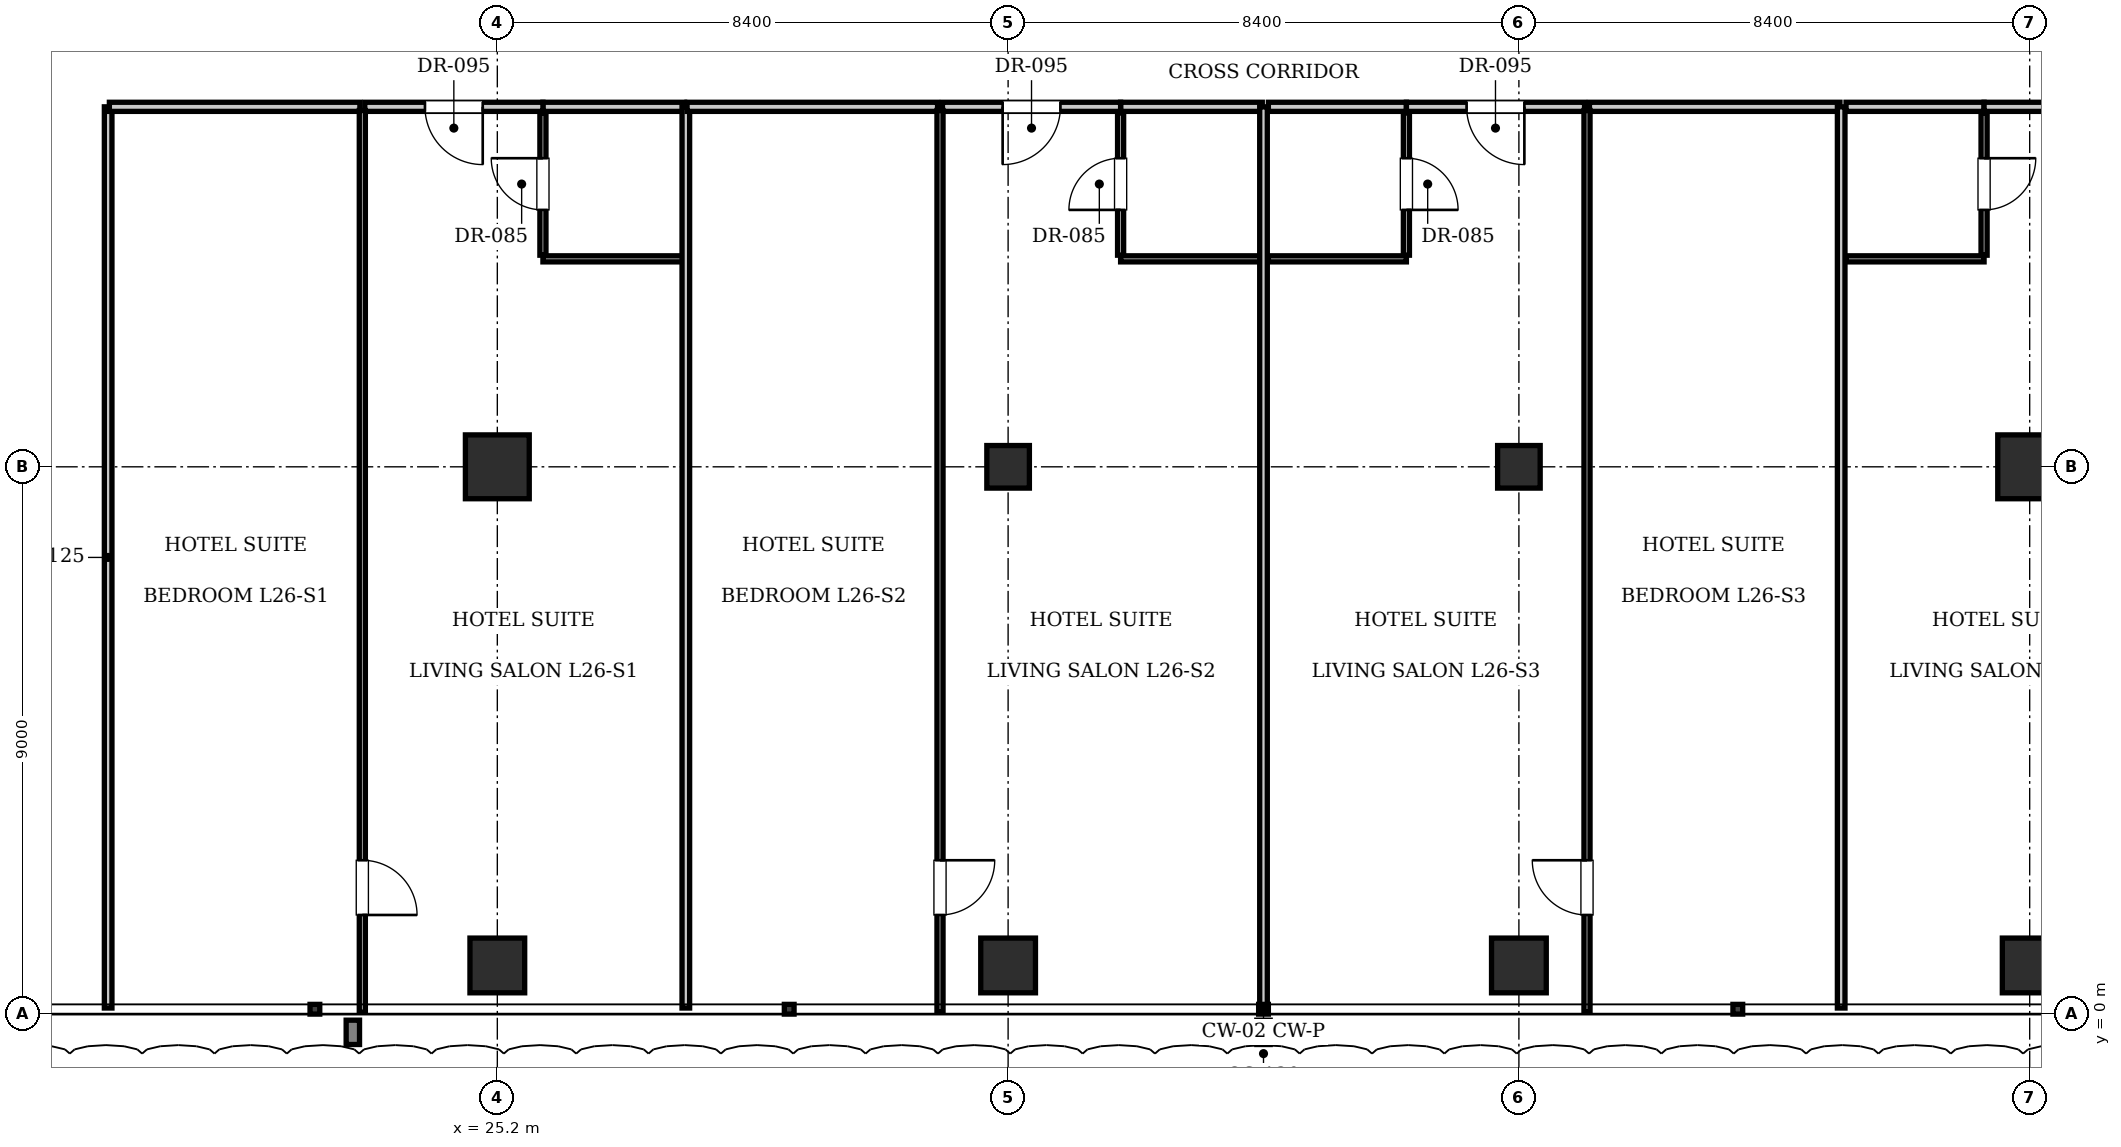
"""IFC4 building model, lengths in metres.
Left out: names, types, materials, properties, quantities, classifications, styles, units other than length and angle.
Written with IfcOpenShell. Run it as: python <this file> out.ifc"""

import sys

from ifc_helpers import new_model, si_unit, direction, frame, frame_2d, origin, origin_2d, place, context, subcontext, project, spatial, rectangle, i_section, extrude, element, fill, save


model = new_model("IFC4")
c1 = context("Model", 3, precision=1e-05, world=origin(), true_north=direction((0.0, 1.0)))
c2 = subcontext(c1, "Body", "Model", "MODEL_VIEW")
j1 = project(units=[si_unit("LENGTHUNIT", "METRE"), si_unit("PLANEANGLEUNIT", "RADIAN")], contexts=[c1])
p1 = place(None, origin())
s1 = spatial("IfcSite", under=j1, at=p1, CompositionType="ELEMENT")
p2 = place(p1, origin())
s2 = spatial("IfcBuilding", under=s1, at=p2, CompositionType="ELEMENT")
p3 = place(p2, frame((0.0, 0.0, 107.8)))
s3 = spatial("IfcBuildingStorey", under=s2, at=p3, CompositionType="ELEMENT", Elevation=107.8)
for number, where, z_axis, x_axis in (
    (1, (25.2, 9.0, 0.0), (0.0, 0.0, 1.0), (1.0, 0.0, 0.0)),
    (2, (50.4, 9.0, 0.0), (0.0, 0.0, 1.0), (1.0, 0.0, 0.0)),
):
    element("IfcColumn", number, at=place(p3, frame(where, z_axis=z_axis, x_axis=x_axis)), inside=s3, PredefinedType="COLUMN", context=c2, shape_type="SweptSolid", body=[
        extrude(rectangle(XDim=1.05, YDim=1.05, at=origin_2d()), origin(), (0.0, 0.0, 1.0), 3.85),
    ])
for number, where, z_axis, x_axis in (
    (3, (33.6, 9.0, 0.0), (0.0, 0.0, 1.0), (1.0, 0.0, 0.0)),
    (4, (42.0, 9.0, 0.0), (0.0, 0.0, 1.0), (1.0, 0.0, 0.0)),
):
    element("IfcColumn", number, at=place(p3, frame(where, z_axis=z_axis, x_axis=x_axis)), inside=s3, PredefinedType="COLUMN", context=c2, shape_type="SweptSolid", body=[
        extrude(i_section(OverallWidth=0.7, OverallDepth=0.7, WebThickness=0.028, FlangeThickness=0.044, at=origin_2d()), origin(), (0.0, 0.0, 1.0), 3.85),
    ])
for number, where, z_axis, x_axis in (
    (5, (25.2, 0.8, 0.0), (0.0, 0.0, 1.0), (1.0, 0.0, 0.0)),
    (6, (33.6, 0.8, 0.0), (0.0, 0.0, 1.0), (1.0, 0.0, 0.0)),
    (7, (42.0, 0.8, 0.0), (0.0, 0.0, 1.0), (1.0, 0.0, 0.0)),
    (8, (50.4, 0.8, 0.0), (0.0, 0.0, 1.0), (1.0, 0.0, 0.0)),
):
    element("IfcColumn", number, at=place(p3, frame(where, z_axis=z_axis, x_axis=x_axis)), inside=s3, PredefinedType="COLUMN", context=c2, shape_type="SweptSolid", body=[
        extrude(rectangle(XDim=0.9, YDim=0.9, at=origin_2d()), origin(), (0.0, 0.0, 1.0), 3.85),
    ])
p4 = place(p3, frame((18.8, 0.1, 0.0), z_axis=(0.0, 0.0, 1.0), x_axis=(0.0, 1.0, 0.0)))
e9 = element("IfcWall", 9, at=p4, inside=s3, PredefinedType="PARTITIONING", context=c2, shape_type="SweptSolid", body=[
    extrude(rectangle(XDim=14.82, YDim=0.125, at=frame_2d((7.41, 0.0))), origin(), (0.0, 0.0, 1.0), 3.61),
])
p5 = place(p3, frame((25.95, 14.92, 0.0), z_axis=(0.0, 0.0, 1.0), x_axis=(1.0, 0.0, 0.0)))
e10 = element("IfcWall", 10, at=p5, inside=s3, PredefinedType="PARTITIONING", context=c2, shape_type="SweptSolid", body=[
    extrude(rectangle(XDim=2.33, YDim=0.15, at=frame_2d((1.165, 0.0))), origin(), (0.0, 0.0, 1.0), 3.61),
])
p6 = place(p3, frame((25.95, 12.42, 0.0), z_axis=(0.0, 0.0, 1.0), x_axis=(1.0, 0.0, 0.0)))
e11 = element("IfcWall", 11, at=p6, inside=s3, PredefinedType="PARTITIONING", context=c2, shape_type="SweptSolid", body=[
    extrude(rectangle(XDim=2.31, YDim=0.1, at=frame_2d((1.155, 0.0))), origin(), (0.0, 0.0, 1.0), 3.61),
])
p7 = place(p3, frame((25.95, 12.48, 0.0), z_axis=(0.0, 0.0, 1.0), x_axis=(0.0, 1.0, 0.0)))
e12 = element("IfcWall", 12, at=p7, inside=s3, PredefinedType="PARTITIONING", context=c2, shape_type="SweptSolid", body=[
    extrude(rectangle(XDim=2.34, YDim=0.1, at=frame_2d((1.17, 0.0))), origin(), (0.0, 0.0, 1.0), 3.61),
])
p8 = place(p7, frame((0.745, 0.0, 0.0)))
e13 = element("IfcOpeningElement", 13, at=p8, cuts=e12, PredefinedType="OPENING", context=c2, shape_type="SweptSolid", body=[
    extrude(rectangle(XDim=0.85, YDim=2.1, at=frame_2d((0.425, 1.05))), frame((0.0, 0.06, 0.0), z_axis=(0.0, -1.0, 0.0), x_axis=(1.0, 0.0, 0.0)), (0.0, 0.0, 1.0), 0.12),
])
p9 = place(p3, frame((18.82, 14.92, 0.0), z_axis=(0.0, 0.0, 1.0), x_axis=(1.0, 0.0, 0.0)))
e14 = element("IfcWall", 14, at=p9, inside=s3, PredefinedType="PARTITIONING", context=c2, shape_type="SweptSolid", body=[
    extrude(rectangle(XDim=4.12, YDim=0.15, at=frame_2d((2.06, 0.0))), origin(), (0.0, 0.0, 1.0), 3.61),
])
p10 = place(p3, frame((23.02, 14.92, 0.0), z_axis=(0.0, 0.0, 1.0), x_axis=(1.0, 0.0, 0.0)))
e15 = element("IfcWall", 15, at=p10, inside=s3, PredefinedType="PARTITIONING", context=c2, shape_type="SweptSolid", body=[
    extrude(rectangle(XDim=2.93, YDim=0.15, at=frame_2d((1.465, 0.0))), origin(), (0.0, 0.0, 1.0), 3.61),
])
p11 = place(p10, frame((0.99, 0.0, 0.0)))
e16 = element("IfcOpeningElement", 16, at=p11, cuts=e15, PredefinedType="OPENING", context=c2, shape_type="SweptSolid", body=[
    extrude(rectangle(XDim=0.95, YDim=2.15, at=frame_2d((0.475, 1.075))), frame((0.0, 0.085, 0.0), z_axis=(0.0, -1.0, 0.0), x_axis=(1.0, 0.0, 0.0)), (0.0, 0.0, 1.0), 0.17),
])
p12 = place(p3, frame((22.98, 0.03, 0.0), z_axis=(0.0, 0.0, 1.0), x_axis=(0.0, 1.0, 0.0)))
e17 = element("IfcWall", 17, at=p12, inside=s3, PredefinedType="PARTITIONING", context=c2, shape_type="SweptSolid", body=[
    extrude(rectangle(XDim=14.83, YDim=0.1, at=frame_2d((7.415, 0.0))), origin(), (0.0, 0.0, 1.0), 3.61),
])
p13 = place(p12, frame((1.6, 0.0, 0.0)))
e18 = element("IfcOpeningElement", 18, at=p13, cuts=e17, PredefinedType="OPENING", context=c2, shape_type="SweptSolid", body=[
    extrude(rectangle(XDim=0.9, YDim=2.1, at=frame_2d((0.45, 1.05))), frame((0.0, 0.06, 0.0), z_axis=(0.0, -1.0, 0.0), x_axis=(1.0, 0.0, 0.0)), (0.0, 0.0, 1.0), 0.12),
])
p14 = place(p3, frame((28.3, 0.1, 0.0), z_axis=(0.0, 0.0, 1.0), x_axis=(0.0, 1.0, 0.0)))
e19 = element("IfcWall", 19, at=p14, inside=s3, PredefinedType="PARTITIONING", context=c2, shape_type="SweptSolid", body=[
    extrude(rectangle(XDim=14.82, YDim=0.125, at=frame_2d((7.41, 0.0))), origin(), (0.0, 0.0, 1.0), 3.61),
])
p15 = place(p3, frame((35.45, 14.92, 0.0), z_axis=(0.0, 0.0, 1.0), x_axis=(1.0, 0.0, 0.0)))
e20 = element("IfcWall", 20, at=p15, inside=s3, PredefinedType="PARTITIONING", context=c2, shape_type="SweptSolid", body=[
    extrude(rectangle(XDim=2.33, YDim=0.15, at=frame_2d((1.165, 0.0))), origin(), (0.0, 0.0, 1.0), 3.61),
])
p16 = place(p3, frame((35.45, 12.42, 0.0), z_axis=(0.0, 0.0, 1.0), x_axis=(1.0, 0.0, 0.0)))
e21 = element("IfcWall", 21, at=p16, inside=s3, PredefinedType="PARTITIONING", context=c2, shape_type="SweptSolid", body=[
    extrude(rectangle(XDim=2.31, YDim=0.1, at=frame_2d((1.155, 0.0))), origin(), (0.0, 0.0, 1.0), 3.61),
])
p17 = place(p3, frame((35.45, 12.48, 0.0), z_axis=(0.0, 0.0, 1.0), x_axis=(0.0, 1.0, 0.0)))
e22 = element("IfcWall", 22, at=p17, inside=s3, PredefinedType="PARTITIONING", context=c2, shape_type="SweptSolid", body=[
    extrude(rectangle(XDim=2.34, YDim=0.1, at=frame_2d((1.17, 0.0))), origin(), (0.0, 0.0, 1.0), 3.61),
])
p18 = place(p17, frame((0.745, 0.0, 0.0)))
e23 = element("IfcOpeningElement", 23, at=p18, cuts=e22, PredefinedType="OPENING", context=c2, shape_type="SweptSolid", body=[
    extrude(rectangle(XDim=0.85, YDim=2.1, at=frame_2d((0.425, 1.05))), frame((0.0, 0.06, 0.0), z_axis=(0.0, -1.0, 0.0), x_axis=(1.0, 0.0, 0.0)), (0.0, 0.0, 1.0), 0.12),
])
p19 = place(p3, frame((28.32, 14.92, 0.0), z_axis=(0.0, 0.0, 1.0), x_axis=(1.0, 0.0, 0.0)))
e24 = element("IfcWall", 24, at=p19, inside=s3, PredefinedType="PARTITIONING", context=c2, shape_type="SweptSolid", body=[
    extrude(rectangle(XDim=4.12, YDim=0.15, at=frame_2d((2.06, 0.0))), origin(), (0.0, 0.0, 1.0), 3.61),
])
p20 = place(p3, frame((32.52, 14.92, 0.0), z_axis=(0.0, 0.0, 1.0), x_axis=(1.0, 0.0, 0.0)))
e25 = element("IfcWall", 25, at=p20, inside=s3, PredefinedType="PARTITIONING", context=c2, shape_type="SweptSolid", body=[
    extrude(rectangle(XDim=2.93, YDim=0.15, at=frame_2d((1.465, 0.0))), origin(), (0.0, 0.0, 1.0), 3.61),
])
p21 = place(p20, frame((0.99, 0.0, 0.0)))
e26 = element("IfcOpeningElement", 26, at=p21, cuts=e25, PredefinedType="OPENING", context=c2, shape_type="SweptSolid", body=[
    extrude(rectangle(XDim=0.95, YDim=2.15, at=frame_2d((0.475, 1.075))), frame((0.0, 0.085, 0.0), z_axis=(0.0, -1.0, 0.0), x_axis=(1.0, 0.0, 0.0)), (0.0, 0.0, 1.0), 0.17),
])
p22 = place(p3, frame((32.48, 0.03, 0.0), z_axis=(0.0, 0.0, 1.0), x_axis=(0.0, 1.0, 0.0)))
e27 = element("IfcWall", 27, at=p22, inside=s3, PredefinedType="PARTITIONING", context=c2, shape_type="SweptSolid", body=[
    extrude(rectangle(XDim=14.83, YDim=0.1, at=frame_2d((7.415, 0.0))), origin(), (0.0, 0.0, 1.0), 3.61),
])
p23 = place(p22, frame((1.6, 0.0, 0.0)))
e28 = element("IfcOpeningElement", 28, at=p23, cuts=e27, PredefinedType="OPENING", context=c2, shape_type="SweptSolid", body=[
    extrude(rectangle(XDim=0.9, YDim=2.1, at=frame_2d((0.45, 1.05))), frame((0.0, 0.06, 0.0), z_axis=(0.0, -1.0, 0.0), x_axis=(1.0, 0.0, 0.0)), (0.0, 0.0, 1.0), 0.12),
])
p24 = place(p3, frame((37.8, 0.1, 0.0), z_axis=(0.0, 0.0, 1.0), x_axis=(0.0, 1.0, 0.0)))
e29 = element("IfcWall", 29, at=p24, inside=s3, PredefinedType="PARTITIONING", context=c2, shape_type="SweptSolid", body=[
    extrude(rectangle(XDim=14.82, YDim=0.125, at=frame_2d((7.41, 0.0))), origin(), (0.0, 0.0, 1.0), 3.207),
])
p25 = place(p3, frame((37.88, 14.92, 0.0), z_axis=(0.0, 0.0, 1.0), x_axis=(1.0, 0.0, 0.0)))
e30 = element("IfcWall", 30, at=p25, inside=s3, PredefinedType="PARTITIONING", context=c2, shape_type="SweptSolid", body=[
    extrude(rectangle(XDim=2.27, YDim=0.15, at=frame_2d((1.135, 0.0))), origin(), (0.0, 0.0, 1.0), 3.61),
])
p26 = place(p3, frame((37.88, 12.42, 0.0), z_axis=(0.0, 0.0, 1.0), x_axis=(1.0, 0.0, 0.0)))
e31 = element("IfcWall", 31, at=p26, inside=s3, PredefinedType="PARTITIONING", context=c2, shape_type="SweptSolid", body=[
    extrude(rectangle(XDim=2.27, YDim=0.1, at=frame_2d((1.135, 0.0))), origin(), (0.0, 0.0, 1.0), 3.61),
])
p27 = place(p3, frame((40.15, 12.48, 0.0), z_axis=(0.0, 0.0, 1.0), x_axis=(0.0, 1.0, 0.0)))
e32 = element("IfcWall", 32, at=p27, inside=s3, PredefinedType="PARTITIONING", context=c2, shape_type="SweptSolid", body=[
    extrude(rectangle(XDim=2.34, YDim=0.1, at=frame_2d((1.17, 0.0))), origin(), (0.0, 0.0, 1.0), 3.61),
])
p28 = place(p27, frame((0.745, 0.0, 0.0)))
e33 = element("IfcOpeningElement", 33, at=p28, cuts=e32, PredefinedType="OPENING", context=c2, shape_type="SweptSolid", body=[
    extrude(rectangle(XDim=0.85, YDim=2.1, at=frame_2d((0.425, 1.05))), frame((0.0, 0.06, 0.0), z_axis=(0.0, -1.0, 0.0), x_axis=(1.0, 0.0, 0.0)), (0.0, 0.0, 1.0), 0.12),
])
p29 = place(p3, frame((40.15, 14.92, 0.0), z_axis=(0.0, 0.0, 1.0), x_axis=(1.0, 0.0, 0.0)))
e34 = element("IfcWall", 34, at=p29, inside=s3, PredefinedType="PARTITIONING", context=c2, shape_type="SweptSolid", body=[
    extrude(rectangle(XDim=2.93, YDim=0.15, at=frame_2d((1.465, 0.0))), origin(), (0.0, 0.0, 1.0), 3.61),
])
p30 = place(p29, frame((0.99, 0.0, 0.0)))
e35 = element("IfcOpeningElement", 35, at=p30, cuts=e34, PredefinedType="OPENING", context=c2, shape_type="SweptSolid", body=[
    extrude(rectangle(XDim=0.95, YDim=2.15, at=frame_2d((0.475, 1.075))), frame((0.0, 0.085, 0.0), z_axis=(0.0, -1.0, 0.0), x_axis=(1.0, 0.0, 0.0)), (0.0, 0.0, 1.0), 0.17),
])
p31 = place(p3, frame((43.16, 14.92, 0.0), z_axis=(0.0, 0.0, 1.0), x_axis=(1.0, 0.0, 0.0)))
e36 = element("IfcWall", 36, at=p31, inside=s3, PredefinedType="PARTITIONING", context=c2, shape_type="SweptSolid", body=[
    extrude(rectangle(XDim=4.12, YDim=0.15, at=frame_2d((2.06, 0.0))), origin(), (0.0, 0.0, 1.0), 3.61),
])
p32 = place(p3, frame((43.12, 0.03, 0.0), z_axis=(0.0, 0.0, 1.0), x_axis=(0.0, 1.0, 0.0)))
e37 = element("IfcWall", 37, at=p32, inside=s3, PredefinedType="PARTITIONING", context=c2, shape_type="SweptSolid", body=[
    extrude(rectangle(XDim=14.83, YDim=0.1, at=frame_2d((7.415, 0.0))), origin(), (0.0, 0.0, 1.0), 3.61),
])
p33 = place(p32, frame((1.6, 0.0, 0.0)))
e38 = element("IfcOpeningElement", 38, at=p33, cuts=e37, PredefinedType="OPENING", context=c2, shape_type="SweptSolid", body=[
    extrude(rectangle(XDim=0.9, YDim=2.1, at=frame_2d((0.45, 1.05))), frame((0.0, 0.06, 0.0), z_axis=(0.0, -1.0, 0.0), x_axis=(1.0, 0.0, 0.0)), (0.0, 0.0, 1.0), 0.12),
])
p34 = place(p3, frame((47.3, 0.1, 0.0), z_axis=(0.0, 0.0, 1.0), x_axis=(0.0, 1.0, 0.0)))
e39 = element("IfcWall", 39, at=p34, inside=s3, PredefinedType="PARTITIONING", context=c2, shape_type="SweptSolid", body=[
    extrude(rectangle(XDim=14.82, YDim=0.125, at=frame_2d((7.41, 0.0))), origin(), (0.0, 0.0, 1.0), 3.61),
])
p35 = place(p3, frame((47.38, 14.92, 0.0), z_axis=(0.0, 0.0, 1.0), x_axis=(1.0, 0.0, 0.0)))
e40 = element("IfcWall", 40, at=p35, inside=s3, PredefinedType="PARTITIONING", context=c2, shape_type="SweptSolid", body=[
    extrude(rectangle(XDim=2.27, YDim=0.15, at=frame_2d((1.135, 0.0))), origin(), (0.0, 0.0, 1.0), 3.61),
])
p36 = place(p3, frame((47.38, 12.42, 0.0), z_axis=(0.0, 0.0, 1.0), x_axis=(1.0, 0.0, 0.0)))
e41 = element("IfcWall", 41, at=p36, inside=s3, PredefinedType="PARTITIONING", context=c2, shape_type="SweptSolid", body=[
    extrude(rectangle(XDim=2.27, YDim=0.1, at=frame_2d((1.135, 0.0))), origin(), (0.0, 0.0, 1.0), 3.61),
])
p37 = place(p3, frame((49.65, 12.48, 0.0), z_axis=(0.0, 0.0, 1.0), x_axis=(0.0, 1.0, 0.0)))
e42 = element("IfcWall", 42, at=p37, inside=s3, PredefinedType="PARTITIONING", context=c2, shape_type="SweptSolid", body=[
    extrude(rectangle(XDim=2.34, YDim=0.1, at=frame_2d((1.17, 0.0))), origin(), (0.0, 0.0, 1.0), 3.61),
])
p38 = place(p37, frame((0.745, 0.0, 0.0)))
e43 = element("IfcOpeningElement", 43, at=p38, cuts=e42, PredefinedType="OPENING", context=c2, shape_type="SweptSolid", body=[
    extrude(rectangle(XDim=0.85, YDim=2.1, at=frame_2d((0.425, 1.05))), frame((0.0, 0.06, 0.0), z_axis=(0.0, -1.0, 0.0), x_axis=(1.0, 0.0, 0.0)), (0.0, 0.0, 1.0), 0.12),
])
p39 = place(p3, frame((49.65, 14.92, 0.0), z_axis=(0.0, 0.0, 1.0), x_axis=(1.0, 0.0, 0.0)))
e44 = element("IfcWall", 44, at=p39, inside=s3, PredefinedType="PARTITIONING", context=c2, shape_type="SweptSolid", body=[
    extrude(rectangle(XDim=2.93, YDim=0.15, at=frame_2d((1.465, 0.0))), origin(), (0.0, 0.0, 1.0), 3.61),
])
p40 = place(p39, frame((0.99, 0.0, 0.0)))
e45 = element("IfcOpeningElement", 45, at=p40, cuts=e44, PredefinedType="OPENING", context=c2, shape_type="SweptSolid", body=[
    extrude(rectangle(XDim=0.95, YDim=2.15, at=frame_2d((0.475, 1.075))), frame((0.0, 0.085, 0.0), z_axis=(0.0, -1.0, 0.0), x_axis=(1.0, 0.0, 0.0)), (0.0, 0.0, 1.0), 0.17),
])
p41 = place(p8, origin())
e46 = element("IfcDoor", 46, at=p41, inside=s3, OperationType="SINGLE_SWING_RIGHT", PredefinedType="DOOR", context=c2, shape_type="SweptSolid", body=[
    extrude(rectangle(XDim=0.85, YDim=2.1, at=frame_2d((0.425, 1.05))), frame((0.0, 0.025, 0.0), z_axis=(0.0, -1.0, 0.0), x_axis=(1.0, 0.0, 0.0)), (0.0, 0.0, 1.0), 0.05),
])
fill(e13, e46)
p42 = place(p11, frame((0.95, 0.0, 0.0), z_axis=(0.0, 0.0, 1.0), x_axis=(-1.0, 0.0, 0.0)))
e47 = element("IfcDoor", 47, at=p42, inside=s3, OperationType="SINGLE_SWING_LEFT", PredefinedType="DOOR", context=c2, shape_type="SweptSolid", body=[
    extrude(rectangle(XDim=0.95, YDim=2.15, at=frame_2d((0.475, 1.075))), frame((0.0, 0.025, 0.0), z_axis=(0.0, -1.0, 0.0), x_axis=(1.0, 0.0, 0.0)), (0.0, 0.0, 1.0), 0.05),
])
fill(e16, e47)
p43 = place(p13, frame((0.9, 0.0, 0.0), z_axis=(0.0, 0.0, 1.0), x_axis=(-1.0, 0.0, 0.0)))
e48 = element("IfcDoor", 48, at=p43, inside=s3, OperationType="SINGLE_SWING_RIGHT", PredefinedType="DOOR", context=c2, shape_type="SweptSolid", body=[
    extrude(rectangle(XDim=0.9, YDim=2.1, at=frame_2d((0.45, 1.05))), frame((0.0, 0.025, 0.0), z_axis=(0.0, -1.0, 0.0), x_axis=(1.0, 0.0, 0.0)), (0.0, 0.0, 1.0), 0.05),
])
fill(e18, e48)
p44 = place(p18, origin())
e49 = element("IfcDoor", 49, at=p44, inside=s3, OperationType="SINGLE_SWING_LEFT", PredefinedType="DOOR", context=c2, shape_type="SweptSolid", body=[
    extrude(rectangle(XDim=0.85, YDim=2.1, at=frame_2d((0.425, 1.05))), frame((0.0, 0.025, 0.0), z_axis=(0.0, -1.0, 0.0), x_axis=(1.0, 0.0, 0.0)), (0.0, 0.0, 1.0), 0.05),
])
fill(e23, e49)
p45 = place(p21, frame((0.95, 0.0, 0.0), z_axis=(0.0, 0.0, 1.0), x_axis=(-1.0, 0.0, 0.0)))
e50 = element("IfcDoor", 50, at=p45, inside=s3, OperationType="SINGLE_SWING_RIGHT", PredefinedType="DOOR", context=c2, shape_type="SweptSolid", body=[
    extrude(rectangle(XDim=0.95, YDim=2.15, at=frame_2d((0.475, 1.075))), frame((0.0, 0.025, 0.0), z_axis=(0.0, -1.0, 0.0), x_axis=(1.0, 0.0, 0.0)), (0.0, 0.0, 1.0), 0.05),
])
fill(e26, e50)
p46 = place(p23, frame((0.9, 0.0, 0.0), z_axis=(0.0, 0.0, 1.0), x_axis=(-1.0, 0.0, 0.0)))
e51 = element("IfcDoor", 51, at=p46, inside=s3, OperationType="SINGLE_SWING_LEFT", PredefinedType="DOOR", context=c2, shape_type="SweptSolid", body=[
    extrude(rectangle(XDim=0.9, YDim=2.1, at=frame_2d((0.45, 1.05))), frame((0.0, 0.025, 0.0), z_axis=(0.0, -1.0, 0.0), x_axis=(1.0, 0.0, 0.0)), (0.0, 0.0, 1.0), 0.05),
])
fill(e28, e51)
p47 = place(p28, frame((0.85, 0.0, 0.0), z_axis=(0.0, 0.0, 1.0), x_axis=(-1.0, 0.0, 0.0)))
e52 = element("IfcDoor", 52, at=p47, inside=s3, OperationType="SINGLE_SWING_RIGHT", PredefinedType="DOOR", context=c2, shape_type="SweptSolid", body=[
    extrude(rectangle(XDim=0.85, YDim=2.1, at=frame_2d((0.425, 1.05))), frame((0.0, 0.025, 0.0), z_axis=(0.0, -1.0, 0.0), x_axis=(1.0, 0.0, 0.0)), (0.0, 0.0, 1.0), 0.05),
])
fill(e33, e52)
p48 = place(p30, frame((0.95, 0.0, 0.0), z_axis=(0.0, 0.0, 1.0), x_axis=(-1.0, 0.0, 0.0)))
e53 = element("IfcDoor", 53, at=p48, inside=s3, OperationType="SINGLE_SWING_LEFT", PredefinedType="DOOR", context=c2, shape_type="SweptSolid", body=[
    extrude(rectangle(XDim=0.95, YDim=2.15, at=frame_2d((0.475, 1.075))), frame((0.0, 0.025, 0.0), z_axis=(0.0, -1.0, 0.0), x_axis=(1.0, 0.0, 0.0)), (0.0, 0.0, 1.0), 0.05),
])
fill(e35, e53)
p49 = place(p33, origin())
e54 = element("IfcDoor", 54, at=p49, inside=s3, OperationType="SINGLE_SWING_RIGHT", PredefinedType="DOOR", context=c2, shape_type="SweptSolid", body=[
    extrude(rectangle(XDim=0.9, YDim=2.1, at=frame_2d((0.45, 1.05))), frame((0.0, 0.025, 0.0), z_axis=(0.0, -1.0, 0.0), x_axis=(1.0, 0.0, 0.0)), (0.0, 0.0, 1.0), 0.05),
])
fill(e38, e54)
p50 = place(p38, frame((0.85, 0.0, 0.0), z_axis=(0.0, 0.0, 1.0), x_axis=(-1.0, 0.0, 0.0)))
e55 = element("IfcDoor", 55, at=p50, inside=s3, OperationType="SINGLE_SWING_LEFT", PredefinedType="DOOR", context=c2, shape_type="SweptSolid", body=[
    extrude(rectangle(XDim=0.85, YDim=2.1, at=frame_2d((0.425, 1.05))), frame((0.0, 0.025, 0.0), z_axis=(0.0, -1.0, 0.0), x_axis=(1.0, 0.0, 0.0)), (0.0, 0.0, 1.0), 0.05),
])
fill(e43, e55)
save(model, sys.argv[1])
